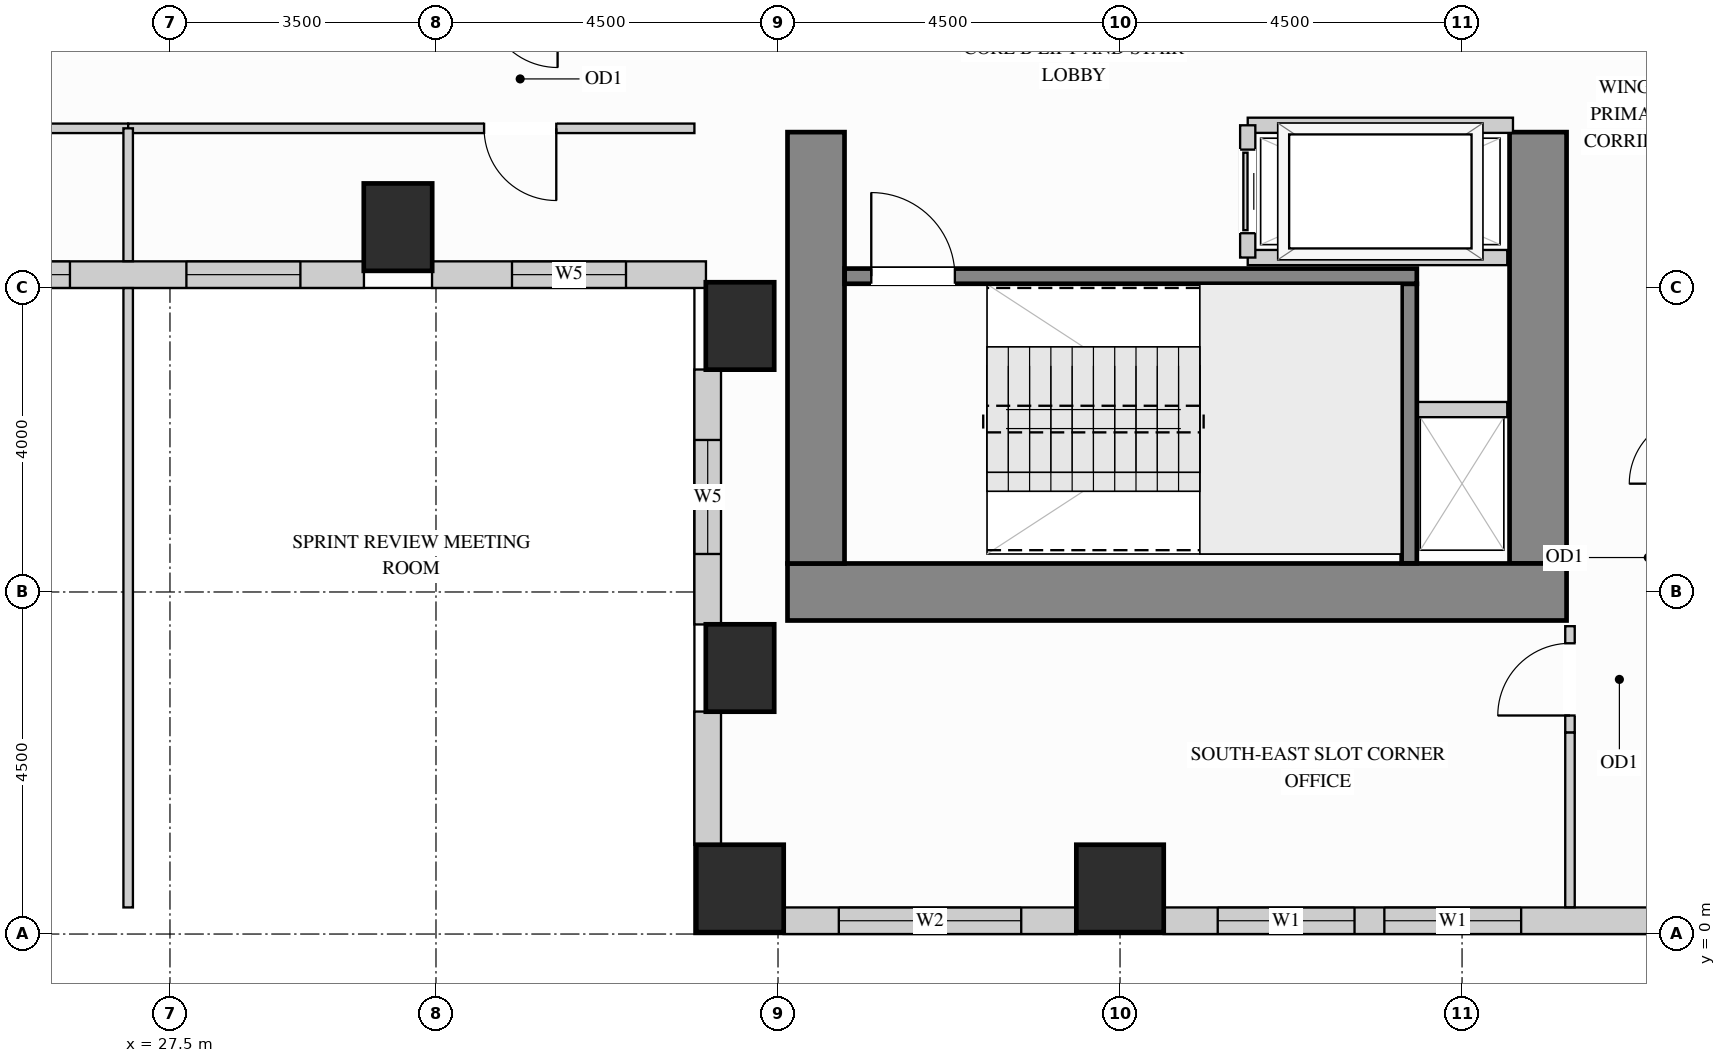
"""IFC4 building model, lengths in metres.
Left out: names, types, materials, properties, quantities, classifications, styles, units other than length and angle.
Written with IfcOpenShell. Run it as: python <this file> out.ifc"""

import sys

from ifc_helpers import new_model, si_unit, direction, frame, frame_2d, origin, origin_2d, place, context, subcontext, project, spatial, rectangle, extrude, source, transform, mapped, element, fill, save


model = new_model("IFC4")
c1 = context("Model", 3, precision=1e-05, world=origin(), true_north=direction((0.0, 1.0)))
c2 = subcontext(c1, "Body", "Model", "MODEL_VIEW")
j1 = project(units=[si_unit("LENGTHUNIT", "METRE"), si_unit("PLANEANGLEUNIT", "RADIAN")], contexts=[c1])
p1 = place(None, origin())
s1 = spatial("IfcSite", under=j1, at=p1, CompositionType="ELEMENT")
p2 = place(p1, origin())
s2 = spatial("IfcBuilding", under=s1, at=p2, CompositionType="ELEMENT")
p3 = place(p2, frame((0.0, 0.0, 127.8)))
s3 = spatial("IfcBuildingStorey", under=s2, at=p3, CompositionType="ELEMENT", Elevation=127.8)
m1 = source(origin(), c2, "Body", "SweptSolid", [
    extrude(rectangle(XDim=0.9, YDim=1.15, at=origin_2d()), origin(), (0.0, 0.0, 1.0), 3.38),
])
for number, where, z_axis, x_axis in (
    (1, (35.0, 3.5, 0.0), (0.0, 0.0, 1.0), (1.0, 0.0, 0.0)),
    (2, (35.0, 8.0, 0.0), (0.0, 0.0, 1.0), (1.0, 0.0, 0.0)),
    (3, (30.5, 9.3, 0.0), (0.0, 0.0, 1.0), (1.0, 0.0, 0.0)),
):
    element("IfcColumn", number, at=place(p3, frame(where, z_axis=z_axis, x_axis=x_axis)), inside=s3, PredefinedType="COLUMN", context=c2, shape_type="MappedRepresentation", body=[
        mapped(m1, transform((0.0, 0.0, 0.0), x_axis=(1.0, 0.0, 0.0), y_axis=(0.0, 1.0, 0.0), z_axis=(0.0, 0.0, 1.0))),
    ])
m2 = source(origin(), c2, "Body", "SweptSolid", [
    extrude(rectangle(XDim=1.15, YDim=1.15, at=origin_2d()), origin(), (0.0, 0.0, 1.0), 3.38),
])
for number, where, z_axis, x_axis in (
    (4, (35.0, 0.6, 0.0), (0.0, 0.0, 1.0), (1.0, 0.0, 0.0)),
    (5, (40.0, 0.6, 0.0), (0.0, 0.0, 1.0), (1.0, 0.0, 0.0)),
):
    element("IfcColumn", number, at=place(p3, frame(where, z_axis=z_axis, x_axis=x_axis)), inside=s3, PredefinedType="COLUMN", context=c2, shape_type="MappedRepresentation", body=[
        mapped(m2, transform((0.0, 0.0, 0.0), x_axis=(1.0, 0.0, 0.0), y_axis=(0.0, 1.0, 0.0), z_axis=(0.0, 0.0, 1.0))),
    ])
m3 = source(origin(), c2, "Body", "SweptSolid", [
    extrude(rectangle(XDim=5.675, YDim=0.75, at=frame_2d((2.837, 0.0))), origin(), (0.0, 0.0, 1.0), 3.38),
])
p4 = place(p3, frame((45.5, 4.875, 0.0), z_axis=(0.0, 0.0, 1.0), x_axis=(0.0, 1.0, 0.0)))
e6 = element("IfcWall", 6, at=p4, inside=s3, PredefinedType="SHEAR", context=c2, shape_type="MappedRepresentation", body=[
    mapped(m3, transform((0.0, 0.0, 0.0), x_axis=(1.0, 0.0, 0.0), y_axis=(0.0, 1.0, 0.0), z_axis=(0.0, 0.0, 1.0))),
])
m4 = source(origin(), c2, "Body", "SweptSolid", [
    extrude(rectangle(XDim=10.25, YDim=0.75, at=frame_2d((5.125, 0.0))), origin(), (0.0, 0.0, 1.0), 3.38),
])
p5 = place(p3, frame((35.625, 4.5, 0.0), z_axis=(0.0, 0.0, 1.0), x_axis=(1.0, 0.0, 0.0)))
e7 = element("IfcWall", 7, at=p5, inside=s3, PredefinedType="SHEAR", context=c2, shape_type="MappedRepresentation", body=[
    mapped(m4, transform((0.0, 0.0, 0.0), x_axis=(1.0, 0.0, 0.0), y_axis=(0.0, 1.0, 0.0), z_axis=(0.0, 0.0, 1.0))),
])
p6 = place(p3, frame((36.0, 4.875, 0.0), z_axis=(0.0, 0.0, 1.0), x_axis=(0.0, 1.0, 0.0)))
e8 = element("IfcWall", 8, at=p6, inside=s3, PredefinedType="SHEAR", context=c2, shape_type="MappedRepresentation", body=[
    mapped(m3, transform((0.0, 0.0, 0.0), x_axis=(1.0, 0.0, 0.0), y_axis=(0.0, 1.0, 0.0), z_axis=(0.0, 0.0, 1.0))),
])
p7 = place(p3, frame((23.848, 8.675, 0.0), z_axis=(0.0, 0.0, 1.0), x_axis=(1.0, 0.0, 0.0)))
e9 = element("IfcWall", 9, at=p7, inside=s3, PredefinedType="SOLIDWALL", context=c2, shape_type="SweptSolid", body=[
    extrude(rectangle(XDim=6.204, YDim=0.35, at=frame_2d((3.102, 0.0))), origin(), (0.0, 0.0, 1.0), 3.365),
])
p8 = place(p7, frame((0.836, 0.0, 0.78)))
e10 = element("IfcOpeningElement", 10, at=p8, cuts=e9, PredefinedType="OPENING", context=c2, shape_type="SweptSolid", body=[
    extrude(rectangle(XDim=1.5, YDim=2.0, at=frame_2d((0.75, 1.0))), frame((0.0, 0.185, 0.0), z_axis=(0.0, -1.0, 0.0), x_axis=(1.0, 0.0, 0.0)), (0.0, 0.0, 1.0), 0.37),
])
p9 = place(p7, frame((3.868, 0.0, 0.78)))
e11 = element("IfcOpeningElement", 11, at=p9, cuts=e9, PredefinedType="OPENING", context=c2, shape_type="SweptSolid", body=[
    extrude(rectangle(XDim=1.5, YDim=2.0, at=frame_2d((0.75, 1.0))), frame((0.0, 0.185, 0.0), z_axis=(0.0, -1.0, 0.0), x_axis=(1.0, 0.0, 0.0)), (0.0, 0.0, 1.0), 0.37),
])
p10 = place(p3, frame((30.948, 8.675, 0.0), z_axis=(0.0, 0.0, 1.0), x_axis=(1.0, 0.0, 0.0)))
e12 = element("IfcWall", 12, at=p10, inside=s3, PredefinedType="SOLIDWALL", context=c2, shape_type="SweptSolid", body=[
    extrude(rectangle(XDim=3.604, YDim=0.35, at=frame_2d((1.802, 0.0))), origin(), (0.0, 0.0, 1.0), 3.365),
])
p11 = place(p10, frame((1.052, 0.0, 0.78)))
e13 = element("IfcOpeningElement", 13, at=p11, cuts=e12, PredefinedType="OPENING", context=c2, shape_type="SweptSolid", body=[
    extrude(rectangle(XDim=1.5, YDim=2.0, at=frame_2d((0.75, 1.0))), frame((0.0, 0.185, 0.0), z_axis=(0.0, -1.0, 0.0), x_axis=(1.0, 0.0, 0.0)), (0.0, 0.0, 1.0), 0.37),
])
p12 = place(p3, frame((34.575, 7.427, 0.0), z_axis=(0.0, 0.0, 1.0), x_axis=(0.0, -1.0, 0.0)))
e14 = element("IfcWall", 14, at=p12, inside=s3, PredefinedType="SOLIDWALL", context=c2, shape_type="SweptSolid", body=[
    extrude(rectangle(XDim=3.354, YDim=0.35, at=frame_2d((1.677, 0.0))), origin(), (0.0, 0.0, 1.0), 3.365),
])
p13 = place(p12, frame((0.927, 0.0, 0.78)))
e15 = element("IfcOpeningElement", 15, at=p13, cuts=e14, PredefinedType="OPENING", context=c2, shape_type="SweptSolid", body=[
    extrude(rectangle(XDim=1.5, YDim=2.0, at=frame_2d((0.75, 1.0))), frame((0.0, 0.185, 0.0), z_axis=(0.0, -1.0, 0.0), x_axis=(1.0, 0.0, 0.0)), (0.0, 0.0, 1.0), 0.37),
])
m5 = source(origin(), c2, "Body", "SweptSolid", [
    extrude(rectangle(XDim=1.754, YDim=0.35, at=frame_2d((0.877, 0.0))), origin(), (0.0, 0.0, 1.0), 3.365),
])
p14 = place(p3, frame((34.575, 2.927, 0.0), z_axis=(0.0, 0.0, 1.0), x_axis=(0.0, -1.0, 0.0)))
e16 = element("IfcWall", 16, at=p14, inside=s3, PredefinedType="SOLIDWALL", context=c2, shape_type="MappedRepresentation", body=[
    mapped(m5, transform((0.0, 0.0, 0.0), x_axis=(1.0, 0.0, 0.0), y_axis=(0.0, 1.0, 0.0), z_axis=(0.0, 0.0, 1.0))),
])
p15 = place(p3, frame((35.573, 0.175, 0.0), z_axis=(0.0, 0.0, 1.0), x_axis=(1.0, 0.0, 0.0)))
e17 = element("IfcWall", 17, at=p15, inside=s3, PredefinedType="SOLIDWALL", context=c2, shape_type="SweptSolid", body=[
    extrude(rectangle(XDim=3.854, YDim=0.35, at=frame_2d((1.927, 0.0))), origin(), (0.0, 0.0, 1.0), 3.365),
])
p16 = place(p15, frame((0.727, 0.0, 0.78)))
e18 = element("IfcOpeningElement", 18, at=p16, cuts=e17, PredefinedType="OPENING", context=c2, shape_type="SweptSolid", body=[
    extrude(rectangle(XDim=2.4, YDim=2.1, at=frame_2d((1.2, 1.05))), frame((0.0, 0.185, 0.0), z_axis=(0.0, -1.0, 0.0), x_axis=(1.0, 0.0, 0.0)), (0.0, 0.0, 1.0), 0.37),
])
p17 = place(p3, frame((40.573, 0.175, 0.0), z_axis=(0.0, 0.0, 1.0), x_axis=(1.0, 0.0, 0.0)))
e19 = element("IfcWall", 19, at=p17, inside=s3, PredefinedType="SOLIDWALL", context=c2, shape_type="SweptSolid", body=[
    extrude(rectangle(XDim=6.454, YDim=0.35, at=frame_2d((3.227, 0.0))), origin(), (0.0, 0.0, 1.0), 3.365),
])
p18 = place(p17, frame((0.712, 0.0, 0.78)))
e20 = element("IfcOpeningElement", 20, at=p18, cuts=e19, PredefinedType="OPENING", context=c2, shape_type="SweptSolid", body=[
    extrude(rectangle(XDim=1.8, YDim=2.1, at=frame_2d((0.9, 1.05))), frame((0.0, 0.185, 0.0), z_axis=(0.0, -1.0, 0.0), x_axis=(1.0, 0.0, 0.0)), (0.0, 0.0, 1.0), 0.37),
])
p19 = place(p17, frame((2.905, 0.0, 0.78)))
e21 = element("IfcOpeningElement", 21, at=p19, cuts=e19, PredefinedType="OPENING", context=c2, shape_type="SweptSolid", body=[
    extrude(rectangle(XDim=1.8, YDim=2.1, at=frame_2d((0.9, 1.05))), frame((0.0, 0.185, 0.0), z_axis=(0.0, -1.0, 0.0), x_axis=(1.0, 0.0, 0.0)), (0.0, 0.0, 1.0), 0.37),
])
p20 = place(p3, frame((45.92, 2.65, 0.0), z_axis=(0.0, 0.0, 1.0), x_axis=(0.0, 1.0, 0.0)))
e22 = element("IfcWall", 22, at=p20, inside=s3, PredefinedType="PARTITIONING", context=c2, shape_type="SweptSolid", body=[
    extrude(rectangle(XDim=1.4, YDim=0.125, at=frame_2d((0.7, 0.0))), origin(), (0.0, 0.0, 1.0), 3.365),
])
p21 = place(p20, frame((0.225, 0.0, 0.0)))
e23 = element("IfcOpeningElement", 23, at=p21, cuts=e22, PredefinedType="OPENING", context=c2, shape_type="SweptSolid", body=[
    extrude(rectangle(XDim=0.95, YDim=2.15, at=frame_2d((0.475, 1.075))), frame((0.0, 0.073, 0.0), z_axis=(0.0, -1.0, 0.0), x_axis=(1.0, 0.0, 0.0)), (0.0, 0.0, 1.0), 0.145),
])
m6 = source(origin(), c2, "Body", "SweptSolid", [
    extrude(rectangle(XDim=2.298, YDim=0.125, at=frame_2d((1.149, 0.0))), origin(), (0.0, 0.0, 1.0), 3.365),
])
p22 = place(p3, frame((45.92, 0.352, 0.0), z_axis=(0.0, 0.0, 1.0), x_axis=(0.0, 1.0, 0.0)))
e24 = element("IfcWall", 24, at=p22, inside=s3, PredefinedType="PARTITIONING", context=c2, shape_type="MappedRepresentation", body=[
    mapped(m6, transform((0.0, 0.0, 0.0), x_axis=(1.0, 0.0, 0.0), y_axis=(0.0, 1.0, 0.0), z_axis=(0.0, 0.0, 1.0))),
])
p23 = place(p3, frame((19.5, 10.6, 0.0), z_axis=(0.0, 0.0, 1.0), x_axis=(1.0, 0.0, 0.0)))
e25 = element("IfcWall", 25, at=p23, inside=s3, PredefinedType="PARTITIONING", context=c2, shape_type="SweptSolid", body=[
    extrude(rectangle(XDim=7.45, YDim=0.125, at=frame_2d((3.725, 0.0))), origin(), (0.0, 0.0, 1.0), 3.365),
])
p24 = place(p23, frame((1.817, 0.0, 0.0)))
e26 = element("IfcOpeningElement", 26, at=p24, cuts=e25, PredefinedType="OPENING", context=c2, shape_type="SweptSolid", body=[
    extrude(rectangle(XDim=0.95, YDim=2.15, at=frame_2d((0.475, 1.075))), frame((0.0, 0.073, 0.0), z_axis=(0.0, -1.0, 0.0), x_axis=(1.0, 0.0, 0.0)), (0.0, 0.0, 1.0), 0.145),
])
p25 = place(p3, frame((26.95, 10.6, 0.0), z_axis=(0.0, 0.0, 1.0), x_axis=(1.0, 0.0, 0.0)))
e27 = element("IfcWall", 27, at=p25, inside=s3, PredefinedType="PARTITIONING", context=c2, shape_type="SweptSolid", body=[
    extrude(rectangle(XDim=7.45, YDim=0.125, at=frame_2d((3.725, 0.0))), origin(), (0.0, 0.0, 1.0), 3.365),
])
p26 = place(p25, frame((4.683, 0.0, 0.0)))
e28 = element("IfcOpeningElement", 28, at=p26, cuts=e27, PredefinedType="OPENING", context=c2, shape_type="SweptSolid", body=[
    extrude(rectangle(XDim=0.95, YDim=2.15, at=frame_2d((0.475, 1.075))), frame((0.0, 0.073, 0.0), z_axis=(0.0, -1.0, 0.0), x_axis=(1.0, 0.0, 0.0)), (0.0, 0.0, 1.0), 0.145),
])
m7 = source(origin(), c2, "Body", "SweptSolid", [
    extrude(rectangle(XDim=8.148, YDim=0.125, at=frame_2d((4.074, 0.0))), origin(), (0.0, 0.0, 1.0), 3.365),
])
p27 = place(p3, frame((26.95, 0.35, 0.0), z_axis=(0.0, 0.0, 1.0), x_axis=(0.0, 1.0, 0.0)))
e29 = element("IfcWall", 29, at=p27, inside=s3, PredefinedType="PARTITIONING", context=c2, shape_type="MappedRepresentation", body=[
    mapped(m7, transform((0.0, 0.0, 0.0), x_axis=(1.0, 0.0, 0.0), y_axis=(0.0, 1.0, 0.0), z_axis=(0.0, 0.0, 1.0))),
])
m8 = source(origin(), c2, "Body", "SweptSolid", [
    extrude(rectangle(XDim=1.748, YDim=0.125, at=frame_2d((0.874, 0.0))), origin(), (0.0, 0.0, 1.0), 3.365),
])
p28 = place(p3, frame((26.95, 8.852, 0.0), z_axis=(0.0, 0.0, 1.0), x_axis=(0.0, 1.0, 0.0)))
e30 = element("IfcWall", 30, at=p28, inside=s3, PredefinedType="PARTITIONING", context=c2, shape_type="MappedRepresentation", body=[
    mapped(m8, transform((0.0, 0.0, 0.0), x_axis=(1.0, 0.0, 0.0), y_axis=(0.0, 1.0, 0.0), z_axis=(0.0, 0.0, 1.0))),
])
m9 = source(origin(), c2, "Body", "SweptSolid", [
    extrude(rectangle(XDim=1.245, YDim=0.2, at=frame_2d((0.623, 0.0))), origin(), (0.0, 0.0, 1.0), 3.365),
])
p29 = place(p3, frame((43.85, 6.9, 0.0), z_axis=(0.0, 0.0, 1.0), x_axis=(1.0, 0.0, 0.0)))
e31 = element("IfcWall", 31, at=p29, inside=s3, PredefinedType="PARTITIONING", context=c2, shape_type="MappedRepresentation", body=[
    mapped(m9, transform((0.0, 0.0, 0.0), x_axis=(1.0, 0.0, 0.0), y_axis=(0.0, 1.0, 0.0), z_axis=(0.0, 0.0, 1.0))),
])
m10 = source(origin(), c2, "Body", "SweptSolid", [
    extrude(rectangle(XDim=3.49, YDim=0.2, at=frame_2d((1.745, 0.0))), origin(), (0.0, 0.0, 1.0), 3.365),
])
p30 = place(p3, frame((41.68, 10.64, 0.0), z_axis=(0.0, 0.0, 1.0), x_axis=(1.0, 0.0, 0.0)))
e32 = element("IfcWall", 32, at=p30, inside=s3, PredefinedType="PARTITIONING", context=c2, shape_type="MappedRepresentation", body=[
    mapped(m10, transform((0.0, 0.0, 0.0), x_axis=(1.0, 0.0, 0.0), y_axis=(0.0, 1.0, 0.0), z_axis=(0.0, 0.0, 1.0))),
])
m11 = source(origin(), c2, "Body", "SweptSolid", [
    extrude(rectangle(XDim=3.415, YDim=0.2, at=frame_2d((1.708, 0.0))), origin(), (0.0, 0.0, 1.0), 3.365),
])
p31 = place(p3, frame((41.68, 8.9, 0.0), z_axis=(0.0, 0.0, 1.0), x_axis=(1.0, 0.0, 0.0)))
e33 = element("IfcWall", 33, at=p31, inside=s3, PredefinedType="PARTITIONING", context=c2, shape_type="MappedRepresentation", body=[
    mapped(m11, transform((0.0, 0.0, 0.0), x_axis=(1.0, 0.0, 0.0), y_axis=(0.0, 1.0, 0.0), z_axis=(0.0, 0.0, 1.0))),
])
p32 = place(p3, frame((41.68, 8.9, 0.0), z_axis=(0.0, 0.0, 1.0), x_axis=(0.0, 1.0, 0.0)))
e34 = element("IfcWall", 34, at=p32, inside=s3, PredefinedType="PARTITIONING", context=c2, shape_type="SweptSolid", body=[
    extrude(rectangle(XDim=1.74, YDim=0.2, at=frame_2d((0.87, 0.0))), origin(), (0.0, 0.0, 1.0), 3.365),
])
p33 = place(p32, frame((0.32, 0.0, 0.0)))
e35 = element("IfcOpeningElement", 35, at=p33, cuts=e34, PredefinedType="OPENING", context=c2, shape_type="SweptSolid", body=[
    extrude(rectangle(XDim=1.1, YDim=2.2, at=frame_2d((0.55, 1.1))), frame((0.0, 0.11, 0.0), z_axis=(0.0, -1.0, 0.0), x_axis=(1.0, 0.0, 0.0)), (0.0, 0.0, 1.0), 0.22),
])
m12 = source(origin(), c2, "Body", "SweptSolid", [
    extrude(rectangle(XDim=3.678, YDim=0.2, at=frame_2d((1.839, 0.0))), origin(), (0.0, 0.0, 1.0), 3.38),
])
p34 = place(p3, frame((43.805, 4.877, 0.0), z_axis=(0.0, 0.0, 1.0), x_axis=(0.0, 1.0, 0.0)))
e36 = element("IfcWall", 36, at=p34, inside=s3, PredefinedType="SHEAR", context=c2, shape_type="MappedRepresentation", body=[
    mapped(m12, transform((0.0, 0.0, 0.0), x_axis=(1.0, 0.0, 0.0), y_axis=(0.0, 1.0, 0.0), z_axis=(0.0, 0.0, 1.0))),
])
p35 = place(p3, frame((36.377, 8.655, 0.0), z_axis=(0.0, 0.0, 1.0), x_axis=(1.0, 0.0, 0.0)))
e37 = element("IfcWall", 37, at=p35, inside=s3, PredefinedType="SHEAR", context=c2, shape_type="SweptSolid", body=[
    extrude(rectangle(XDim=7.528, YDim=0.2, at=frame_2d((3.764, 0.0))), origin(), (0.0, 0.0, 1.0), 3.38),
])
p36 = place(p35, frame((0.35, 0.0, 0.0)))
e38 = element("IfcOpeningElement", 38, at=p36, cuts=e37, PredefinedType="OPENING", context=c2, shape_type="SweptSolid", body=[
    extrude(rectangle(XDim=1.1, YDim=2.15, at=frame_2d((0.55, 1.075))), frame((0.0, 0.11, 0.0), z_axis=(0.0, -1.0, 0.0), x_axis=(1.0, 0.0, 0.0)), (0.0, 0.0, 1.0), 0.22),
])
m13 = source(origin(), c2, "Body", "SweptSolid", [
    extrude(rectangle(XDim=1.1, YDim=2.2, at=frame_2d((0.55, 1.1))), frame((0.0, 0.025, 0.0), z_axis=(0.0, -1.0, 0.0), x_axis=(1.0, 0.0, 0.0)), (0.0, 0.0, 1.0), 0.05),
])
p37 = place(p33, origin())
e39 = element("IfcDoor", 39, at=p37, inside=s3, OperationType="SLIDING_TO_LEFT", PredefinedType="DOOR", context=c2, shape_type="MappedRepresentation", body=[
    mapped(m13, transform((0.0, 0.0, 0.0), x_axis=(1.0, 0.0, 0.0), y_axis=(0.0, 1.0, 0.0), z_axis=(0.0, 0.0, 1.0))),
])
fill(e35, e39)
m14 = source(origin(), c2, "Body", "SweptSolid", [
    extrude(rectangle(XDim=0.95, YDim=2.15, at=frame_2d((0.475, 1.075))), frame((0.0, 0.025, 0.0), z_axis=(0.0, -1.0, 0.0), x_axis=(1.0, 0.0, 0.0)), (0.0, 0.0, 1.0), 0.05),
])
p38 = place(p21, origin())
e40 = element("IfcDoor", 40, at=p38, inside=s3, OperationType="SINGLE_SWING_LEFT", PredefinedType="DOOR", context=c2, shape_type="MappedRepresentation", body=[
    mapped(m14, transform((0.0, 0.0, 0.0), x_axis=(1.0, 0.0, 0.0), y_axis=(0.0, 1.0, 0.0), z_axis=(0.0, 0.0, 1.0))),
])
fill(e23, e40)
p39 = place(p26, origin())
e41 = element("IfcDoor", 41, at=p39, inside=s3, OperationType="SINGLE_SWING_RIGHT", PredefinedType="DOOR", context=c2, shape_type="MappedRepresentation", body=[
    mapped(m14, transform((0.0, 0.0, 0.0), x_axis=(1.0, 0.0, 0.0), y_axis=(0.0, 1.0, 0.0), z_axis=(0.0, 0.0, 1.0))),
])
fill(e28, e41)
m15 = source(origin(), c2, "Body", "SweptSolid", [
    extrude(rectangle(XDim=1.1, YDim=2.15, at=frame_2d((0.55, 1.075))), frame((0.0, 0.025, 0.0), z_axis=(0.0, -1.0, 0.0), x_axis=(1.0, 0.0, 0.0)), (0.0, 0.0, 1.0), 0.05),
])
p40 = place(p36, origin())
e42 = element("IfcDoor", 42, at=p40, inside=s3, OperationType="SINGLE_SWING_LEFT", PredefinedType="DOOR", context=c2, shape_type="MappedRepresentation", body=[
    mapped(m15, transform((0.0, 0.0, 0.0), x_axis=(1.0, 0.0, 0.0), y_axis=(0.0, 1.0, 0.0), z_axis=(0.0, 0.0, 1.0))),
])
fill(e38, e42)
m16 = source(origin(), c2, "Body", "SweptSolid", [
    extrude(rectangle(XDim=1.8, YDim=2.1, at=frame_2d((0.9, 1.05))), frame((0.0, 0.03, 0.0), z_axis=(0.0, -1.0, 0.0), x_axis=(1.0, 0.0, 0.0)), (0.0, 0.0, 1.0), 0.06),
])
p41 = place(p18, origin())
e43 = element("IfcWindow", 43, at=p41, inside=s3, PartitioningType="SINGLE_PANEL", PredefinedType="WINDOW", context=c2, shape_type="MappedRepresentation", body=[
    mapped(m16, transform((0.0, 0.0, 0.0), x_axis=(1.0, 0.0, 0.0), y_axis=(0.0, 1.0, 0.0), z_axis=(0.0, 0.0, 1.0))),
])
fill(e20, e43)
p42 = place(p19, origin())
e44 = element("IfcWindow", 44, at=p42, inside=s3, PartitioningType="SINGLE_PANEL", PredefinedType="WINDOW", context=c2, shape_type="MappedRepresentation", body=[
    mapped(m16, transform((0.0, 0.0, 0.0), x_axis=(1.0, 0.0, 0.0), y_axis=(0.0, 1.0, 0.0), z_axis=(0.0, 0.0, 1.0))),
])
fill(e21, e44)
m17 = source(origin(), c2, "Body", "SweptSolid", [
    extrude(rectangle(XDim=2.4, YDim=2.1, at=frame_2d((1.2, 1.05))), frame((0.0, 0.03, 0.0), z_axis=(0.0, -1.0, 0.0), x_axis=(1.0, 0.0, 0.0)), (0.0, 0.0, 1.0), 0.06),
])
p43 = place(p16, origin())
e45 = element("IfcWindow", 45, at=p43, inside=s3, PartitioningType="SINGLE_PANEL", PredefinedType="WINDOW", context=c2, shape_type="MappedRepresentation", body=[
    mapped(m17, transform((0.0, 0.0, 0.0), x_axis=(1.0, 0.0, 0.0), y_axis=(0.0, 1.0, 0.0), z_axis=(0.0, 0.0, 1.0))),
])
fill(e18, e45)
m18 = source(origin(), c2, "Body", "SweptSolid", [
    extrude(rectangle(XDim=1.5, YDim=2.0, at=frame_2d((0.75, 1.0))), frame((0.0, 0.03, 0.0), z_axis=(0.0, -1.0, 0.0), x_axis=(1.0, 0.0, 0.0)), (0.0, 0.0, 1.0), 0.06),
])
p44 = place(p8, origin())
e46 = element("IfcWindow", 46, at=p44, inside=s3, PartitioningType="SINGLE_PANEL", PredefinedType="WINDOW", context=c2, shape_type="MappedRepresentation", body=[
    mapped(m18, transform((0.0, 0.0, 0.0), x_axis=(1.0, 0.0, 0.0), y_axis=(0.0, 1.0, 0.0), z_axis=(0.0, 0.0, 1.0))),
])
fill(e10, e46)
p45 = place(p9, origin())
e47 = element("IfcWindow", 47, at=p45, inside=s3, PartitioningType="SINGLE_PANEL", PredefinedType="WINDOW", context=c2, shape_type="MappedRepresentation", body=[
    mapped(m18, transform((0.0, 0.0, 0.0), x_axis=(1.0, 0.0, 0.0), y_axis=(0.0, 1.0, 0.0), z_axis=(0.0, 0.0, 1.0))),
])
fill(e11, e47)
p46 = place(p11, origin())
e48 = element("IfcWindow", 48, at=p46, inside=s3, PartitioningType="SINGLE_PANEL", PredefinedType="WINDOW", context=c2, shape_type="MappedRepresentation", body=[
    mapped(m18, transform((0.0, 0.0, 0.0), x_axis=(1.0, 0.0, 0.0), y_axis=(0.0, 1.0, 0.0), z_axis=(0.0, 0.0, 1.0))),
])
fill(e13, e48)
p47 = place(p13, origin())
e49 = element("IfcWindow", 49, at=p47, inside=s3, PartitioningType="SINGLE_PANEL", PredefinedType="WINDOW", context=c2, shape_type="MappedRepresentation", body=[
    mapped(m18, transform((0.0, 0.0, 0.0), x_axis=(1.0, 0.0, 0.0), y_axis=(0.0, 1.0, 0.0), z_axis=(0.0, 0.0, 1.0))),
])
fill(e15, e49)
save(model, sys.argv[1])
